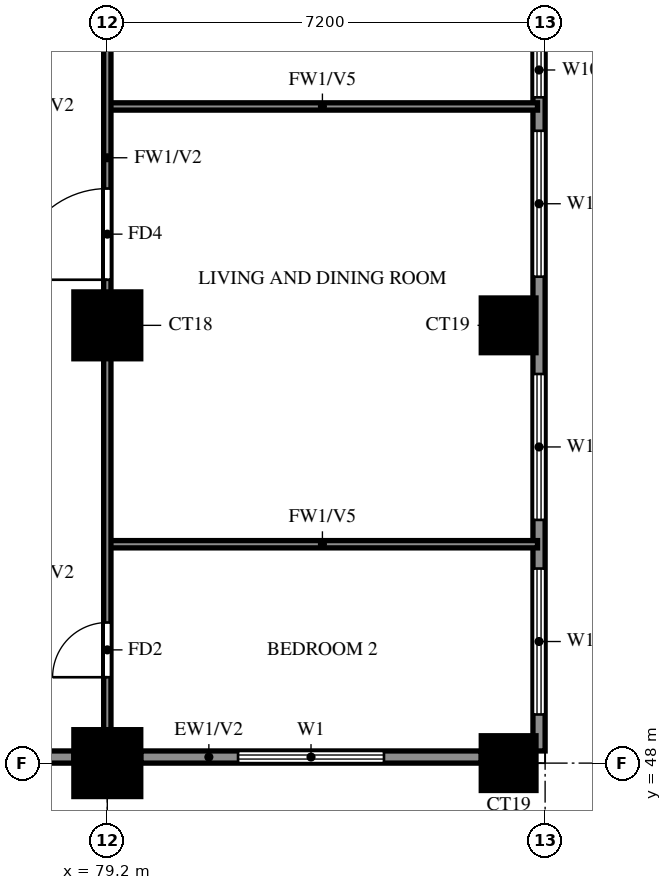
"""IFC4 building model, lengths in metres.
Left out: names, types, materials, properties, quantities, classifications, styles, units other than length and angle.
Written with IfcOpenShell. Run it as: python <this file> out.ifc"""

import sys

from ifc_helpers import new_model, si_unit, direction, frame, frame_2d, origin, origin_2d, place, context, subcontext, project, spatial, rectangle, extrude, source, transform, mapped, element, fill, save


model = new_model("IFC4")
c1 = context("Model", 3, precision=1e-05, world=origin(), true_north=direction((0.0, 1.0)))
c2 = subcontext(c1, "Body", "Model", "MODEL_VIEW")
j1 = project(units=[si_unit("LENGTHUNIT", "METRE"), si_unit("PLANEANGLEUNIT", "RADIAN")], contexts=[c1])
p1 = place(None, origin())
s1 = spatial("IfcSite", under=j1, at=p1, CompositionType="ELEMENT")
p2 = place(p1, origin())
s2 = spatial("IfcBuilding", under=s1, at=p2, CompositionType="ELEMENT")
p3 = place(p2, frame((0.0, 0.0, 130.5)))
s3 = spatial("IfcBuildingStorey", under=s2, at=p3, CompositionType="ELEMENT", Elevation=130.5)
m1 = source(origin(), c2, "Body", "SweptSolid", [
    extrude(rectangle(XDim=1.1, YDim=1.1, at=origin_2d()), origin(), (0.0, 0.0, 1.0), 3.2),
])
p4 = place(p3, frame((79.2, 48.0, 0.0), z_axis=(0.0, 0.0, 1.0), x_axis=(1.0, 0.0, 0.0)))
e1 = element("IfcColumn", 1, at=p4, inside=s3, PredefinedType="COLUMN", context=c2, shape_type="MappedRepresentation", body=[
    mapped(m1, transform((0.0, 0.0, 0.0))),
])
m2 = source(origin(), c2, "Body", "SweptSolid", [
    extrude(rectangle(XDim=0.9, YDim=0.9, at=origin_2d()), origin(), (0.0, 0.0, 1.0), 3.2),
])
p5 = place(p3, frame((85.8, 48.0, 0.0), z_axis=(0.0, 0.0, 1.0), x_axis=(1.0, 0.0, 0.0)))
e2 = element("IfcColumn", 2, at=p5, inside=s3, PredefinedType="COLUMN", context=c2, shape_type="MappedRepresentation", body=[
    mapped(m2, transform((0.0, 0.0, 0.0))),
])
p6 = place(p3, frame((79.2, 55.2, 0.0), z_axis=(0.0, 0.0, 1.0), x_axis=(1.0, 0.0, 0.0)))
e3 = element("IfcColumn", 3, at=p6, inside=s3, PredefinedType="COLUMN", context=c2, shape_type="MappedRepresentation", body=[
    mapped(m1, transform((0.0, 0.0, 0.0))),
])
p7 = place(p3, frame((85.8, 55.2, 0.0), z_axis=(0.0, 0.0, 1.0), x_axis=(1.0, 0.0, 0.0)))
e4 = element("IfcColumn", 4, at=p7, inside=s3, PredefinedType="COLUMN", context=c2, shape_type="MappedRepresentation", body=[
    mapped(m2, transform((0.0, 0.0, 0.0))),
])
p8 = place(p3, frame((85.719, 39.881, 0.0), z_axis=(0.0, 0.0, 1.0), x_axis=(-0.86377618652, 0.503875678716, 0.0)))
e5 = element("IfcWall", 5, at=p8, inside=s3, PredefinedType="SOLIDWALL", context=c2, shape_type="SweptSolid", body=[
    extrude(rectangle(XDim=16.311, YDim=0.2, at=frame_2d((8.156, 0.0))), origin(), (0.0, 0.0, 1.0), 3.2),
])
p9 = place(p8, frame((13.326, 0.0, 1.5)))
e6 = element("IfcOpeningElement", 6, at=p9, cuts=e5, PredefinedType="OPENING", context=c2, shape_type="SweptSolid", body=[
    extrude(rectangle(XDim=0.9, YDim=0.9, at=frame_2d((0.45, 0.45))), frame((0.0, 0.11, 0.0), z_axis=(0.0, -1.0, 0.0), x_axis=(1.0, 0.0, 0.0)), (0.0, 0.0, 1.0), 0.22),
])
p10 = place(p3, frame((71.99, 48.1, 0.0), z_axis=(0.0, 0.0, 1.0), x_axis=(1.0, 0.0, 0.0)))
e7 = element("IfcWall", 7, at=p10, inside=s3, PredefinedType="SOLIDWALL", context=c2, shape_type="SweptSolid", body=[
    extrude(rectangle(XDim=6.66, YDim=0.2, at=frame_2d((3.33, 0.0))), origin(), (0.0, 0.0, 1.0), 3.2),
])
p11 = place(p10, frame((2.205, 0.0, 1.5)))
e8 = element("IfcOpeningElement", 8, at=p11, cuts=e7, PredefinedType="OPENING", context=c2, shape_type="SweptSolid", body=[
    extrude(rectangle(XDim=0.9, YDim=0.9, at=frame_2d((0.45, 0.45))), frame((0.0, 0.11, 0.0), z_axis=(0.0, -1.0, 0.0), x_axis=(1.0, 0.0, 0.0)), (0.0, 0.0, 1.0), 0.22),
])
p12 = place(p3, frame((79.75, 48.1, 0.0), z_axis=(0.0, 0.0, 1.0), x_axis=(1.0, 0.0, 0.0)))
e9 = element("IfcWall", 9, at=p12, inside=s3, PredefinedType="SOLIDWALL", context=c2, shape_type="SweptSolid", body=[
    extrude(rectangle(XDim=5.6, YDim=0.2, at=frame_2d((2.8, 0.0))), origin(), (0.0, 0.0, 1.0), 3.2),
])
p13 = place(p12, frame((1.6, 0.0, 0.6)))
e10 = element("IfcOpeningElement", 10, at=p13, cuts=e9, PredefinedType="OPENING", context=c2, shape_type="SweptSolid", body=[
    extrude(rectangle(XDim=2.4, YDim=2.4, at=frame_2d((1.2, 1.2))), frame((0.0, 0.11, 0.0), z_axis=(0.0, -1.0, 0.0), x_axis=(1.0, 0.0, 0.0)), (0.0, 0.0, 1.0), 0.22),
])
p14 = place(p3, frame((86.3, 48.2, 0.0), z_axis=(0.0, 0.0, 1.0), x_axis=(0.0, 1.0, 0.0)))
e11 = element("IfcWall", 11, at=p14, inside=s3, PredefinedType="SOLIDWALL", context=c2, shape_type="SweptSolid", body=[
    extrude(rectangle(XDim=28.6, YDim=0.2, at=frame_2d((14.3, 0.0))), origin(), (0.0, 0.0, 1.0), 3.2),
])
p15 = place(p14, frame((15.1, 0.0, 0.0)))
e12 = element("IfcOpeningElement", 12, at=p15, cuts=e11, PredefinedType="OPENING", context=c2, shape_type="SweptSolid", body=[
    extrude(rectangle(XDim=1.8, YDim=2.4, at=frame_2d((0.9, 1.2))), frame((0.0, 0.11, 0.0), z_axis=(0.0, -1.0, 0.0), x_axis=(1.0, 0.0, 0.0)), (0.0, 0.0, 1.0), 0.22),
])
p16 = place(p14, frame((0.6, 0.0, 0.6)))
e13 = element("IfcOpeningElement", 13, at=p16, cuts=e11, PredefinedType="OPENING", context=c2, shape_type="SweptSolid", body=[
    extrude(rectangle(XDim=2.4, YDim=2.4, at=frame_2d((1.2, 1.2))), frame((0.0, 0.11, 0.0), z_axis=(0.0, -1.0, 0.0), x_axis=(1.0, 0.0, 0.0)), (0.0, 0.0, 1.0), 0.22),
])
p17 = place(p14, frame((3.8, 0.0, 0.6)))
e14 = element("IfcOpeningElement", 14, at=p17, cuts=e11, PredefinedType="OPENING", context=c2, shape_type="SweptSolid", body=[
    extrude(rectangle(XDim=2.4, YDim=2.4, at=frame_2d((1.2, 1.2))), frame((0.0, 0.11, 0.0), z_axis=(0.0, -1.0, 0.0), x_axis=(1.0, 0.0, 0.0)), (0.0, 0.0, 1.0), 0.22),
])
p18 = place(p14, frame((7.8, 0.0, 0.6)))
e15 = element("IfcOpeningElement", 15, at=p18, cuts=e11, PredefinedType="OPENING", context=c2, shape_type="SweptSolid", body=[
    extrude(rectangle(XDim=2.4, YDim=2.4, at=frame_2d((1.2, 1.2))), frame((0.0, 0.11, 0.0), z_axis=(0.0, -1.0, 0.0), x_axis=(1.0, 0.0, 0.0)), (0.0, 0.0, 1.0), 0.22),
])
p19 = place(p14, frame((10.75, 0.0, 0.6)))
e16 = element("IfcOpeningElement", 16, at=p19, cuts=e11, PredefinedType="OPENING", context=c2, shape_type="SweptSolid", body=[
    extrude(rectangle(XDim=0.9, YDim=2.4, at=frame_2d((0.45, 1.2))), frame((0.0, 0.11, 0.0), z_axis=(0.0, -1.0, 0.0), x_axis=(1.0, 0.0, 0.0)), (0.0, 0.0, 1.0), 0.22),
])
p20 = place(p14, frame((12.5, 0.0, 0.6)))
e17 = element("IfcOpeningElement", 17, at=p20, cuts=e11, PredefinedType="OPENING", context=c2, shape_type="SweptSolid", body=[
    extrude(rectangle(XDim=1.2, YDim=2.4, at=frame_2d((0.6, 1.2))), frame((0.0, 0.11, 0.0), z_axis=(0.0, -1.0, 0.0), x_axis=(1.0, 0.0, 0.0)), (0.0, 0.0, 1.0), 0.22),
])
p21 = place(p14, frame((19.55, 0.0, 1.5)))
e18 = element("IfcOpeningElement", 18, at=p21, cuts=e11, PredefinedType="OPENING", context=c2, shape_type="SweptSolid", body=[
    extrude(rectangle(XDim=0.9, YDim=0.9, at=frame_2d((0.45, 0.45))), frame((0.0, 0.11, 0.0), z_axis=(0.0, -1.0, 0.0), x_axis=(1.0, 0.0, 0.0)), (0.0, 0.0, 1.0), 0.22),
])
p22 = place(p14, frame((22.5, 0.0, 0.6)))
e19 = element("IfcOpeningElement", 19, at=p22, cuts=e11, PredefinedType="OPENING", context=c2, shape_type="SweptSolid", body=[
    extrude(rectangle(XDim=1.8, YDim=2.4, at=frame_2d((0.9, 1.2))), frame((0.0, 0.11, 0.0), z_axis=(0.0, -1.0, 0.0), x_axis=(1.0, 0.0, 0.0)), (0.0, 0.0, 1.0), 0.22),
])
p23 = place(p14, frame((25.4, 0.0, 0.6)))
e20 = element("IfcOpeningElement", 20, at=p23, cuts=e11, PredefinedType="OPENING", context=c2, shape_type="SweptSolid", body=[
    extrude(rectangle(XDim=2.4, YDim=2.4, at=frame_2d((1.2, 1.2))), frame((0.0, 0.11, 0.0), z_axis=(0.0, -1.0, 0.0), x_axis=(1.0, 0.0, 0.0)), (0.0, 0.0, 1.0), 0.22),
])
for number, where, z_axis, x_axis in (
    (21, (79.2, 51.6, 0.0), (0.0, 0.0, 1.0), (1.0, 0.0, 0.0)),
    (22, (79.2, 58.8, 0.0), (0.0, 0.0, 1.0), (1.0, 0.0, 0.0)),
):
    element("IfcWall", number, at=place(p3, frame(where, z_axis=z_axis, x_axis=x_axis)), inside=s3, PredefinedType="PARTITIONING", context=c2, shape_type="SweptSolid", body=[
        extrude(rectangle(XDim=7.075, YDim=0.12, at=frame_2d((3.538, 0.0))), origin(), (0.0, 0.0, 1.0), 2.3),
    ])
p24 = place(p3, frame((79.2, 48.125, 0.0), z_axis=(0.0, 0.0, 1.0), x_axis=(0.0, 1.0, 0.0)))
e23 = element("IfcWall", 23, at=p24, inside=s3, PredefinedType="PARTITIONING", context=c2, shape_type="SweptSolid", body=[
    extrude(rectangle(XDim=17.875, YDim=0.12, at=frame_2d((8.938, 0.0))), origin(), (0.0, 0.0, 1.0), 3.2),
])
p25 = place(p24, frame((1.288, 0.0, 0.0)))
e24 = element("IfcOpeningElement", 24, at=p25, cuts=e23, PredefinedType="OPENING", context=c2, shape_type="SweptSolid", body=[
    extrude(rectangle(XDim=0.9, YDim=2.1, at=frame_2d((0.45, 1.05))), frame((0.0, 0.07, 0.0), z_axis=(0.0, -1.0, 0.0), x_axis=(1.0, 0.0, 0.0)), (0.0, 0.0, 1.0), 0.14),
])
p26 = place(p24, frame((7.825, 0.0, 0.0)))
e25 = element("IfcOpeningElement", 25, at=p26, cuts=e23, PredefinedType="OPENING", context=c2, shape_type="SweptSolid", body=[
    extrude(rectangle(XDim=1.5, YDim=2.1, at=frame_2d((0.75, 1.05))), frame((0.0, 0.07, 0.0), z_axis=(0.0, -1.0, 0.0), x_axis=(1.0, 0.0, 0.0)), (0.0, 0.0, 1.0), 0.14),
])
p27 = place(p24, frame((12.025, 0.0, 0.0)))
e26 = element("IfcOpeningElement", 26, at=p27, cuts=e23, PredefinedType="OPENING", context=c2, shape_type="SweptSolid", body=[
    extrude(rectangle(XDim=0.9, YDim=2.1, at=frame_2d((0.45, 1.05))), frame((0.0, 0.07, 0.0), z_axis=(0.0, -1.0, 0.0), x_axis=(1.0, 0.0, 0.0)), (0.0, 0.0, 1.0), 0.14),
])
p28 = place(p24, frame((15.625, 0.0, 0.0)))
e27 = element("IfcOpeningElement", 27, at=p28, cuts=e23, PredefinedType="OPENING", context=c2, shape_type="SweptSolid", body=[
    extrude(rectangle(XDim=0.9, YDim=2.1, at=frame_2d((0.45, 1.05))), frame((0.0, 0.07, 0.0), z_axis=(0.0, -1.0, 0.0), x_axis=(1.0, 0.0, 0.0)), (0.0, 0.0, 1.0), 0.14),
])
p29 = place(p13, origin())
e28 = element("IfcWindow", 28, at=p29, inside=s3, PartitioningType="DOUBLE_PANEL_VERTICAL", PredefinedType="WINDOW", context=c2, shape_type="SweptSolid", body=[
    extrude(rectangle(XDim=2.4, YDim=2.4, at=frame_2d((1.2, 1.2))), frame((0.0, 0.03, 0.0), z_axis=(0.0, -1.0, 0.0), x_axis=(1.0, 0.0, 0.0)), (0.0, 0.0, 1.0), 0.06),
])
fill(e10, e28)
p30 = place(p16, origin())
e29 = element("IfcWindow", 29, at=p30, inside=s3, PartitioningType="DOUBLE_PANEL_VERTICAL", PredefinedType="WINDOW", context=c2, shape_type="SweptSolid", body=[
    extrude(rectangle(XDim=2.4, YDim=2.4, at=frame_2d((1.2, 1.2))), frame((0.0, 0.03, 0.0), z_axis=(0.0, -1.0, 0.0), x_axis=(1.0, 0.0, 0.0)), (0.0, 0.0, 1.0), 0.06),
])
fill(e13, e29)
p31 = place(p17, origin())
e30 = element("IfcWindow", 30, at=p31, inside=s3, PartitioningType="DOUBLE_PANEL_VERTICAL", PredefinedType="WINDOW", context=c2, shape_type="SweptSolid", body=[
    extrude(rectangle(XDim=2.4, YDim=2.4, at=frame_2d((1.2, 1.2))), frame((0.0, 0.03, 0.0), z_axis=(0.0, -1.0, 0.0), x_axis=(1.0, 0.0, 0.0)), (0.0, 0.0, 1.0), 0.06),
])
fill(e14, e30)
p32 = place(p18, origin())
e31 = element("IfcWindow", 31, at=p32, inside=s3, PartitioningType="DOUBLE_PANEL_VERTICAL", PredefinedType="WINDOW", context=c2, shape_type="SweptSolid", body=[
    extrude(rectangle(XDim=2.4, YDim=2.4, at=frame_2d((1.2, 1.2))), frame((0.0, 0.03, 0.0), z_axis=(0.0, -1.0, 0.0), x_axis=(1.0, 0.0, 0.0)), (0.0, 0.0, 1.0), 0.06),
])
fill(e15, e31)
p33 = place(p19, origin())
e32 = element("IfcWindow", 32, at=p33, inside=s3, PartitioningType="SINGLE_PANEL", PredefinedType="WINDOW", context=c2, shape_type="SweptSolid", body=[
    extrude(rectangle(XDim=0.9, YDim=2.4, at=frame_2d((0.45, 1.2))), frame((0.0, 0.03, 0.0), z_axis=(0.0, -1.0, 0.0), x_axis=(1.0, 0.0, 0.0)), (0.0, 0.0, 1.0), 0.06),
])
fill(e16, e32)
p34 = place(p25, origin())
e33 = element("IfcDoor", 33, at=p34, inside=s3, OperationType="SINGLE_SWING_LEFT", PredefinedType="DOOR", context=c2, shape_type="SweptSolid", body=[
    extrude(rectangle(XDim=0.9, YDim=2.1, at=frame_2d((0.45, 1.05))), frame((0.0, 0.025, 0.0), z_axis=(0.0, -1.0, 0.0), x_axis=(1.0, 0.0, 0.0)), (0.0, 0.0, 1.0), 0.05),
])
fill(e24, e33)
p35 = place(p26, origin())
e34 = element("IfcDoor", 34, at=p35, inside=s3, OperationType="SINGLE_SWING_LEFT", PredefinedType="DOOR", context=c2, shape_type="SweptSolid", body=[
    extrude(rectangle(XDim=1.5, YDim=2.1, at=frame_2d((0.75, 1.05))), frame((0.0, 0.025, 0.0), z_axis=(0.0, -1.0, 0.0), x_axis=(1.0, 0.0, 0.0)), (0.0, 0.0, 1.0), 0.05),
])
fill(e25, e34)
save(model, sys.argv[1])
